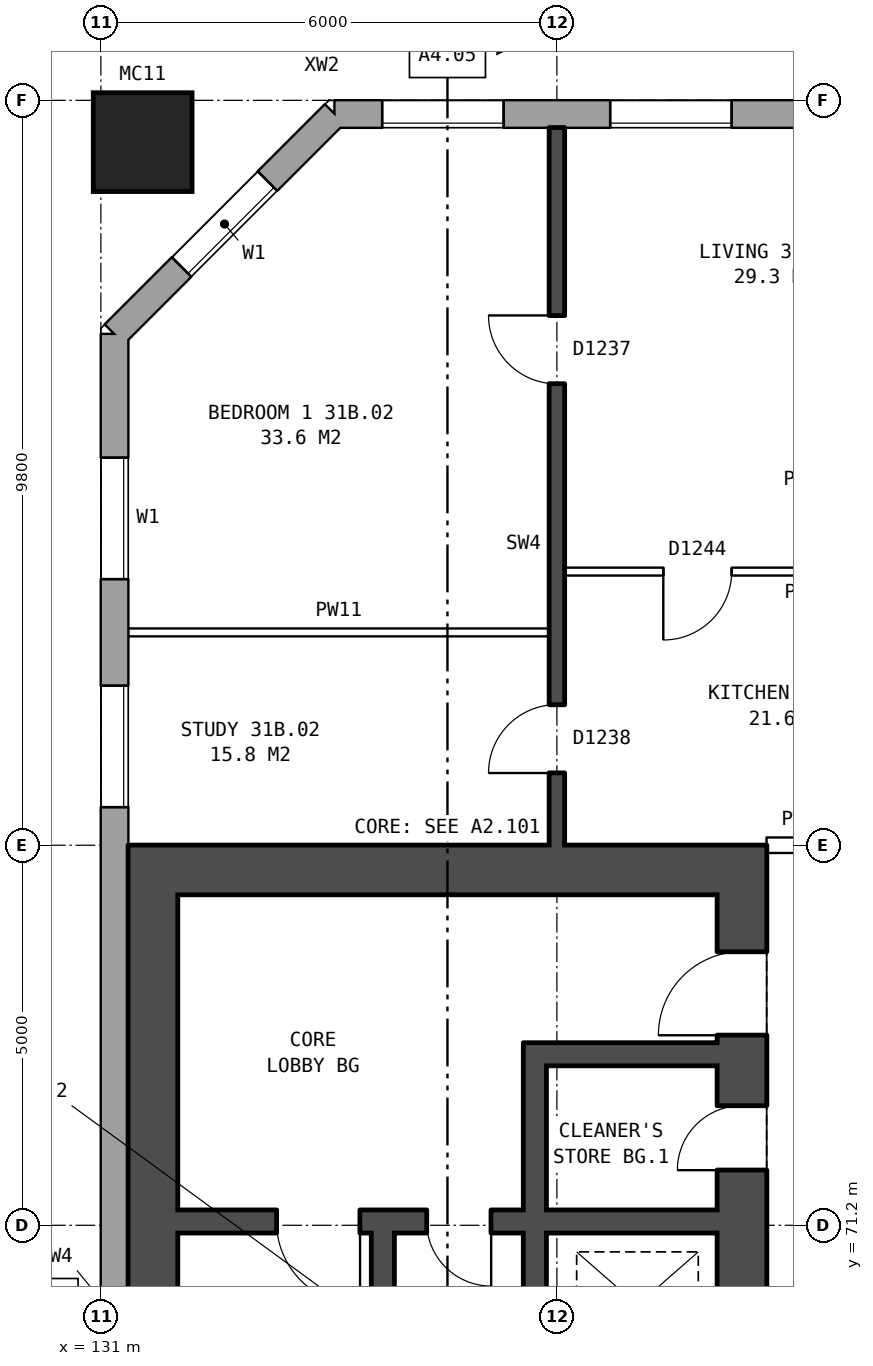
"""IFC4 building model, lengths in metres.
Left out: names, types, materials, properties, quantities, classifications, styles, units other than length and angle.
Written with IfcOpenShell. Run it as: python <this file> out.ifc"""

import sys

from ifc_helpers import new_model, si_unit, direction, frame, frame_2d, origin, origin_2d, place, context, subcontext, project, spatial, rectangle, hollow_rectangle, extrude, element, fill, save


model = new_model("IFC4")
c1 = context("Model", 3, precision=1e-05, world=origin(), true_north=direction((0.0, 1.0)))
c2 = subcontext(c1, "Body", "Model", "MODEL_VIEW")
j1 = project(units=[si_unit("LENGTHUNIT", "METRE"), si_unit("PLANEANGLEUNIT", "RADIAN")], contexts=[c1])
p1 = place(None, origin())
s1 = spatial("IfcSite", under=j1, at=p1, CompositionType="ELEMENT")
p2 = place(p1, origin())
s2 = spatial("IfcBuilding", under=s1, at=p2, CompositionType="ELEMENT")
p3 = place(p2, frame((0.0, 0.0, 111.9)))
s3 = spatial("IfcBuildingStorey", under=s2, at=p3, CompositionType="ELEMENT", Elevation=111.9)
p4 = place(p3, frame((131.55, 85.45, 0.0), z_axis=(0.0, 0.0, 1.0), x_axis=(1.0, 0.0, 0.0)))
e1 = element("IfcColumn", 1, at=p4, inside=s3, PredefinedType="COLUMN", context=c2, shape_type="SweptSolid", body=[
    extrude(hollow_rectangle(XDim=1.3, YDim=1.3, WallThickness=0.07, at=origin_2d()), origin(), (0.0, 0.0, 1.0), 3.1),
])
p5 = place(p3, frame((170.925, 85.82, 0.0), z_axis=(0.0, 0.0, 1.0), x_axis=(-1.0, 0.0, 0.0)))
e2 = element("IfcWall", 2, at=p5, inside=s3, PredefinedType="STANDARD", context=c2, shape_type="SweptSolid", body=[
    extrude(rectangle(XDim=36.851, YDim=0.36, at=frame_2d((18.425, 0.0))), origin(), (0.0, 0.0, 1.0), 2.85),
])
p6 = place(p5, frame((1.625, 0.0, 0.8)))
e3 = element("IfcOpeningElement", 3, at=p6, cuts=e2, PredefinedType="OPENING", context=c2, shape_type="SweptSolid", body=[
    extrude(rectangle(XDim=1.6, YDim=1.8, at=frame_2d((0.8, 0.9))), frame((0.0, 0.19, 0.0), z_axis=(0.0, -1.0, 0.0), x_axis=(1.0, 0.0, 0.0)), (0.0, 0.0, 1.0), 0.38),
])
p7 = place(p5, frame((4.625, 0.0, 0.8)))
e4 = element("IfcOpeningElement", 4, at=p7, cuts=e2, PredefinedType="OPENING", context=c2, shape_type="SweptSolid", body=[
    extrude(rectangle(XDim=1.6, YDim=1.8, at=frame_2d((0.8, 0.9))), frame((0.0, 0.19, 0.0), z_axis=(0.0, -1.0, 0.0), x_axis=(1.0, 0.0, 0.0)), (0.0, 0.0, 1.0), 0.38),
])
p8 = place(p5, frame((7.625, 0.0, 0.8)))
e5 = element("IfcOpeningElement", 5, at=p8, cuts=e2, PredefinedType="OPENING", context=c2, shape_type="SweptSolid", body=[
    extrude(rectangle(XDim=1.6, YDim=1.8, at=frame_2d((0.8, 0.9))), frame((0.0, 0.19, 0.0), z_axis=(0.0, -1.0, 0.0), x_axis=(1.0, 0.0, 0.0)), (0.0, 0.0, 1.0), 0.38),
])
p9 = place(p5, frame((10.625, 0.0, 0.8)))
e6 = element("IfcOpeningElement", 6, at=p9, cuts=e2, PredefinedType="OPENING", context=c2, shape_type="SweptSolid", body=[
    extrude(rectangle(XDim=1.6, YDim=1.8, at=frame_2d((0.8, 0.9))), frame((0.0, 0.19, 0.0), z_axis=(0.0, -1.0, 0.0), x_axis=(1.0, 0.0, 0.0)), (0.0, 0.0, 1.0), 0.38),
])
p10 = place(p5, frame((13.625, 0.0, 0.8)))
e7 = element("IfcOpeningElement", 7, at=p10, cuts=e2, PredefinedType="OPENING", context=c2, shape_type="SweptSolid", body=[
    extrude(rectangle(XDim=1.6, YDim=1.8, at=frame_2d((0.8, 0.9))), frame((0.0, 0.19, 0.0), z_axis=(0.0, -1.0, 0.0), x_axis=(1.0, 0.0, 0.0)), (0.0, 0.0, 1.0), 0.38),
])
p11 = place(p5, frame((17.075, 0.0, 0.15)))
e8 = element("IfcOpeningElement", 8, at=p11, cuts=e2, PredefinedType="OPENING", context=c2, shape_type="SweptSolid", body=[
    extrude(rectangle(XDim=0.6, YDim=0.9, at=frame_2d((0.3, 0.45))), frame((0.0, 0.19, 0.0), z_axis=(0.0, -1.0, 0.0), x_axis=(1.0, 0.0, 0.0)), (0.0, 0.0, 1.0), 0.38),
])
p12 = place(p5, frame((19.075, 0.0, 0.25)))
e9 = element("IfcOpeningElement", 9, at=p12, cuts=e2, PredefinedType="OPENING", context=c2, shape_type="SweptSolid", body=[
    extrude(rectangle(XDim=0.6, YDim=0.9, at=frame_2d((0.3, 0.45))), frame((0.0, 0.19, 0.0), z_axis=(0.0, -1.0, 0.0), x_axis=(1.0, 0.0, 0.0)), (0.0, 0.0, 1.0), 0.38),
])
p13 = place(p5, frame((22.625, 0.0, 0.8)))
e10 = element("IfcOpeningElement", 10, at=p13, cuts=e2, PredefinedType="OPENING", context=c2, shape_type="SweptSolid", body=[
    extrude(rectangle(XDim=1.6, YDim=1.8, at=frame_2d((0.8, 0.9))), frame((0.0, 0.19, 0.0), z_axis=(0.0, -1.0, 0.0), x_axis=(1.0, 0.0, 0.0)), (0.0, 0.0, 1.0), 0.38),
])
p14 = place(p5, frame((25.625, 0.0, 0.8)))
e11 = element("IfcOpeningElement", 11, at=p14, cuts=e2, PredefinedType="OPENING", context=c2, shape_type="SweptSolid", body=[
    extrude(rectangle(XDim=1.6, YDim=1.8, at=frame_2d((0.8, 0.9))), frame((0.0, 0.19, 0.0), z_axis=(0.0, -1.0, 0.0), x_axis=(1.0, 0.0, 0.0)), (0.0, 0.0, 1.0), 0.38),
])
p15 = place(p5, frame((28.625, 0.0, 0.8)))
e12 = element("IfcOpeningElement", 12, at=p15, cuts=e2, PredefinedType="OPENING", context=c2, shape_type="SweptSolid", body=[
    extrude(rectangle(XDim=1.6, YDim=1.8, at=frame_2d((0.8, 0.9))), frame((0.0, 0.19, 0.0), z_axis=(0.0, -1.0, 0.0), x_axis=(1.0, 0.0, 0.0)), (0.0, 0.0, 1.0), 0.38),
])
p16 = place(p5, frame((31.625, 0.0, 0.8)))
e13 = element("IfcOpeningElement", 13, at=p16, cuts=e2, PredefinedType="OPENING", context=c2, shape_type="SweptSolid", body=[
    extrude(rectangle(XDim=1.6, YDim=1.8, at=frame_2d((0.8, 0.9))), frame((0.0, 0.19, 0.0), z_axis=(0.0, -1.0, 0.0), x_axis=(1.0, 0.0, 0.0)), (0.0, 0.0, 1.0), 0.38),
])
p17 = place(p5, frame((34.625, 0.0, 0.8)))
e14 = element("IfcOpeningElement", 14, at=p17, cuts=e2, PredefinedType="OPENING", context=c2, shape_type="SweptSolid", body=[
    extrude(rectangle(XDim=1.6, YDim=1.8, at=frame_2d((0.8, 0.9))), frame((0.0, 0.19, 0.0), z_axis=(0.0, -1.0, 0.0), x_axis=(1.0, 0.0, 0.0)), (0.0, 0.0, 1.0), 0.38),
])
p18 = place(p5, frame((17.975, 0.0, 0.25)))
e15 = element("IfcOpeningElement", 15, at=p18, cuts=e2, PredefinedType="OPENING", context=c2, shape_type="SweptSolid", body=[
    extrude(rectangle(XDim=0.8, YDim=1.5, at=frame_2d((0.4, 0.75))), frame((0.0, 0.19, 0.0), z_axis=(0.0, -1.0, 0.0), x_axis=(1.0, 0.0, 0.0)), (0.0, 0.0, 1.0), 0.38),
])
p19 = place(p5, frame((20.525, 0.0, 1.35)))
e16 = element("IfcOpeningElement", 16, at=p19, cuts=e2, PredefinedType="OPENING", context=c2, shape_type="SweptSolid", body=[
    extrude(rectangle(XDim=1.2, YDim=1.2, at=frame_2d((0.6, 0.6))), frame((0.0, 0.19, 0.0), z_axis=(0.0, -1.0, 0.0), x_axis=(1.0, 0.0, 0.0)), (0.0, 0.0, 1.0), 0.38),
])
p20 = place(p3, frame((134.075, 85.82, 0.0), z_axis=(0.0, 0.0, 1.0), x_axis=(-0.707106781187, -0.707106781187, 0.0)))
e17 = element("IfcWall", 17, at=p20, inside=s3, PredefinedType="STANDARD", context=c2, shape_type="SweptSolid", body=[
    extrude(rectangle(XDim=4.094, YDim=0.36, at=frame_2d((2.047, 0.0))), origin(), (0.0, 0.0, 1.0), 2.85),
])
p21 = place(p20, frame((1.247, 0.0, 0.8)))
e18 = element("IfcOpeningElement", 18, at=p21, cuts=e17, PredefinedType="OPENING", context=c2, shape_type="SweptSolid", body=[
    extrude(rectangle(XDim=1.6, YDim=1.8, at=frame_2d((0.8, 0.9))), frame((0.0, 0.19, 0.0), z_axis=(0.0, -1.0, 0.0), x_axis=(1.0, 0.0, 0.0)), (0.0, 0.0, 1.0), 0.38),
])
p22 = place(p3, frame((131.18, 82.925, 0.0), z_axis=(0.0, 0.0, 1.0), x_axis=(0.0, -1.0, 0.0)))
e19 = element("IfcWall", 19, at=p22, inside=s3, PredefinedType="STANDARD", context=c2, shape_type="SweptSolid", body=[
    extrude(rectangle(XDim=25.851, YDim=0.36, at=frame_2d((12.925, 0.0))), origin(), (0.0, 0.0, 1.0), 2.85),
])
p23 = place(p22, frame((1.625, 0.0, 0.8)))
e20 = element("IfcOpeningElement", 20, at=p23, cuts=e19, PredefinedType="OPENING", context=c2, shape_type="SweptSolid", body=[
    extrude(rectangle(XDim=1.6, YDim=1.8, at=frame_2d((0.8, 0.9))), frame((0.0, 0.19, 0.0), z_axis=(0.0, -1.0, 0.0), x_axis=(1.0, 0.0, 0.0)), (0.0, 0.0, 1.0), 0.38),
])
p24 = place(p22, frame((4.625, 0.0, 0.8)))
e21 = element("IfcOpeningElement", 21, at=p24, cuts=e19, PredefinedType="OPENING", context=c2, shape_type="SweptSolid", body=[
    extrude(rectangle(XDim=1.6, YDim=1.8, at=frame_2d((0.8, 0.9))), frame((0.0, 0.19, 0.0), z_axis=(0.0, -1.0, 0.0), x_axis=(1.0, 0.0, 0.0)), (0.0, 0.0, 1.0), 0.38),
])
p25 = place(p22, frame((19.625, 0.0, 0.8)))
e22 = element("IfcOpeningElement", 22, at=p25, cuts=e19, PredefinedType="OPENING", context=c2, shape_type="SweptSolid", body=[
    extrude(rectangle(XDim=1.6, YDim=1.8, at=frame_2d((0.8, 0.9))), frame((0.0, 0.19, 0.0), z_axis=(0.0, -1.0, 0.0), x_axis=(1.0, 0.0, 0.0)), (0.0, 0.0, 1.0), 0.38),
])
p26 = place(p22, frame((22.625, 0.0, 0.8)))
e23 = element("IfcOpeningElement", 23, at=p26, cuts=e19, PredefinedType="OPENING", context=c2, shape_type="SweptSolid", body=[
    extrude(rectangle(XDim=1.6, YDim=1.8, at=frame_2d((0.8, 0.9))), frame((0.0, 0.19, 0.0), z_axis=(0.0, -1.0, 0.0), x_axis=(1.0, 0.0, 0.0)), (0.0, 0.0, 1.0), 0.38),
])
p27 = place(p3, frame((139.435, 64.45, 0.0), z_axis=(0.0, 0.0, 1.0), x_axis=(0.0, 1.0, 0.0)))
e24 = element("IfcWall", 24, at=p27, inside=s3, PredefinedType="SHEAR", context=c2, shape_type="SweptSolid", body=[
    extrude(rectangle(XDim=11.1, YDim=0.65, at=frame_2d((5.55, 0.0))), origin(), (0.0, 0.0, 1.0), 2.85),
])
p28 = place(p27, frame((0.675, 0.0, 0.0)))
e25 = element("IfcOpeningElement", 25, at=p28, cuts=e24, PredefinedType="OPENING", context=c2, shape_type="SweptSolid", body=[
    extrude(rectangle(XDim=1.1, YDim=2.1, at=frame_2d((0.55, 1.05))), frame((0.0, 0.335, 0.0), z_axis=(0.0, -1.0, 0.0), x_axis=(1.0, 0.0, 0.0)), (0.0, 0.0, 1.0), 0.67),
])
p29 = place(p27, frame((9.25, 0.0, 0.0)))
e26 = element("IfcOpeningElement", 26, at=p29, cuts=e24, PredefinedType="OPENING", context=c2, shape_type="SweptSolid", body=[
    extrude(rectangle(XDim=1.1, YDim=2.1, at=frame_2d((0.55, 1.05))), frame((0.0, 0.335, 0.0), z_axis=(0.0, -1.0, 0.0), x_axis=(1.0, 0.0, 0.0)), (0.0, 0.0, 1.0), 0.67),
])
p30 = place(p27, frame((7.475, 0.0, 0.0)))
e27 = element("IfcOpeningElement", 27, at=p30, cuts=e24, PredefinedType="OPENING", context=c2, shape_type="SweptSolid", body=[
    extrude(rectangle(XDim=0.85, YDim=2.1, at=frame_2d((0.425, 1.05))), frame((0.0, 0.335, 0.0), z_axis=(0.0, -1.0, 0.0), x_axis=(1.0, 0.0, 0.0)), (0.0, 0.0, 1.0), 0.67),
])
p31 = place(p3, frame((131.685, 64.45, 0.0), z_axis=(0.0, 0.0, 1.0), x_axis=(0.0, 1.0, 0.0)))
e28 = element("IfcWall", 28, at=p31, inside=s3, PredefinedType="SHEAR", context=c2, shape_type="SweptSolid", body=[
    extrude(rectangle(XDim=11.1, YDim=0.65, at=frame_2d((5.55, 0.0))), origin(), (0.0, 0.0, 1.0), 2.85),
])
p32 = place(p3, frame((139.76, 75.875, 0.0), z_axis=(0.0, 0.0, 1.0), x_axis=(-1.0, 0.0, 0.0)))
e29 = element("IfcWall", 29, at=p32, inside=s3, PredefinedType="SHEAR", context=c2, shape_type="SweptSolid", body=[
    extrude(rectangle(XDim=8.4, YDim=0.65, at=frame_2d((4.2, 0.0))), origin(), (0.0, 0.0, 1.0), 2.85),
])
p33 = place(p3, frame((139.11, 71.25, 0.0), z_axis=(0.0, 0.0, 1.0), x_axis=(-1.0, 0.0, 0.0)))
e30 = element("IfcWall", 30, at=p33, inside=s3, PredefinedType="SHEAR", context=c2, shape_type="SweptSolid", body=[
    extrude(rectangle(XDim=7.1, YDim=0.3, at=frame_2d((3.55, 0.0))), origin(), (0.0, 0.0, 1.0), 2.85),
])
p34 = place(p33, frame((4.7, 0.0, 0.0)))
e31 = element("IfcOpeningElement", 31, at=p34, cuts=e30, PredefinedType="OPENING", context=c2, shape_type="SweptSolid", body=[
    extrude(rectangle(XDim=1.1, YDim=2.1, at=frame_2d((0.55, 1.05))), frame((0.0, 0.16, 0.0), z_axis=(0.0, -1.0, 0.0), x_axis=(1.0, 0.0, 0.0)), (0.0, 0.0, 1.0), 0.32),
])
p35 = place(p33, frame((2.975, 0.0, 0.0)))
e32 = element("IfcOpeningElement", 32, at=p35, cuts=e30, PredefinedType="OPENING", context=c2, shape_type="SweptSolid", body=[
    extrude(rectangle(XDim=0.85, YDim=2.1, at=frame_2d((0.425, 1.05))), frame((0.0, 0.16, 0.0), z_axis=(0.0, -1.0, 0.0), x_axis=(1.0, 0.0, 0.0)), (0.0, 0.0, 1.0), 0.32),
])
p36 = place(p3, frame((139.11, 73.45, 0.0), z_axis=(0.0, 0.0, 1.0), x_axis=(-1.0, 0.0, 0.0)))
e33 = element("IfcWall", 33, at=p36, inside=s3, PredefinedType="SHEAR", context=c2, shape_type="SweptSolid", body=[
    extrude(rectangle(XDim=2.25, YDim=0.3, at=frame_2d((1.125, 0.0))), origin(), (0.0, 0.0, 1.0), 2.85),
])
p37 = place(p3, frame((136.71, 67.0, 0.0), z_axis=(0.0, 0.0, 1.0), x_axis=(0.0, 1.0, 0.0)))
e34 = element("IfcWall", 34, at=p37, inside=s3, PredefinedType="SHEAR", context=c2, shape_type="SweptSolid", body=[
    extrude(rectangle(XDim=4.1, YDim=0.3, at=frame_2d((2.05, 0.0))), origin(), (0.0, 0.0, 1.0), 2.85),
])
p38 = place(p3, frame((136.71, 71.4, 0.0), z_axis=(0.0, 0.0, 1.0), x_axis=(0.0, 1.0, 0.0)))
e35 = element("IfcWall", 35, at=p38, inside=s3, PredefinedType="SHEAR", context=c2, shape_type="SweptSolid", body=[
    extrude(rectangle(XDim=2.2, YDim=0.3, at=frame_2d((1.1, 0.0))), origin(), (0.0, 0.0, 1.0), 2.85),
])
p39 = place(p3, frame((134.71, 64.45, 0.0), z_axis=(0.0, 0.0, 1.0), x_axis=(0.0, 1.0, 0.0)))
e36 = element("IfcWall", 36, at=p39, inside=s3, PredefinedType="SHEAR", context=c2, shape_type="SweptSolid", body=[
    extrude(rectangle(XDim=6.65, YDim=0.3, at=frame_2d((3.325, 0.0))), origin(), (0.0, 0.0, 1.0), 2.85),
])
p40 = place(p3, frame((139.76, 76.2, 0.0), z_axis=(0.0, 0.0, 1.0), x_axis=(1.0, 0.0, 0.0)))
e37 = element("IfcWall", 37, at=p40, inside=s3, PredefinedType="PARTITIONING", context=c2, shape_type="SweptSolid", body=[
    extrude(rectangle(XDim=3.0, YDim=0.2, at=frame_2d((1.5, 0.0))), origin(), (0.0, 0.0, 1.0), 2.85),
])
p41 = place(p40, frame((1.0, 0.0, 0.0)))
e38 = element("IfcOpeningElement", 38, at=p41, cuts=e37, PredefinedType="OPENING", context=c2, shape_type="SweptSolid", body=[
    extrude(rectangle(XDim=1.0, YDim=2.1, at=frame_2d((0.5, 1.05))), frame((0.0, 0.11, 0.0), z_axis=(0.0, -1.0, 0.0), x_axis=(1.0, 0.0, 0.0)), (0.0, 0.0, 1.0), 0.22),
])
p42 = place(p3, frame((131.36, 79.0, 0.0), z_axis=(0.0, 0.0, 1.0), x_axis=(1.0, 0.0, 0.0)))
e39 = element("IfcWall", 39, at=p42, inside=s3, PredefinedType="PARTITIONING", context=c2, shape_type="SweptSolid", body=[
    extrude(rectangle(XDim=5.54, YDim=0.1, at=frame_2d((2.77, 0.0))), origin(), (0.0, 0.0, 1.0), 2.85),
])
p43 = place(p3, frame((137.1, 79.8, 0.0), z_axis=(0.0, 0.0, 1.0), x_axis=(1.0, 0.0, 0.0)))
e40 = element("IfcWall", 40, at=p43, inside=s3, PredefinedType="PARTITIONING", context=c2, shape_type="SweptSolid", body=[
    extrude(rectangle(XDim=5.8, YDim=0.1, at=frame_2d((2.9, 0.0))), origin(), (0.0, 0.0, 1.0), 2.85),
])
p44 = place(p43, frame((1.3, 0.0, 0.0)))
e41 = element("IfcOpeningElement", 41, at=p44, cuts=e40, PredefinedType="OPENING", context=c2, shape_type="SweptSolid", body=[
    extrude(rectangle(XDim=0.9, YDim=2.1, at=frame_2d((0.45, 1.05))), frame((0.0, 0.06, 0.0), z_axis=(0.0, -1.0, 0.0), x_axis=(1.0, 0.0, 0.0)), (0.0, 0.0, 1.0), 0.12),
])
p45 = place(p43, frame((4.2, 0.0, 0.0)))
e42 = element("IfcOpeningElement", 42, at=p45, cuts=e40, PredefinedType="OPENING", context=c2, shape_type="SweptSolid", body=[
    extrude(rectangle(XDim=0.9, YDim=2.1, at=frame_2d((0.45, 1.05))), frame((0.0, 0.06, 0.0), z_axis=(0.0, -1.0, 0.0), x_axis=(1.0, 0.0, 0.0)), (0.0, 0.0, 1.0), 0.12),
])
p46 = place(p3, frame((137.0, 76.2, 0.0), z_axis=(0.0, 0.0, 1.0), x_axis=(0.0, 1.0, 0.0)))
e43 = element("IfcWall", 43, at=p46, inside=s3, PredefinedType="SOLIDWALL", context=c2, shape_type="SweptSolid", body=[
    extrude(rectangle(XDim=9.44, YDim=0.2, at=frame_2d((4.72, 0.0))), origin(), (0.0, 0.0, 1.0), 2.85),
])
p47 = place(p46, frame((6.07, 0.0, 0.0)))
e44 = element("IfcOpeningElement", 44, at=p47, cuts=e43, PredefinedType="OPENING", context=c2, shape_type="SweptSolid", body=[
    extrude(rectangle(XDim=0.9, YDim=2.1, at=frame_2d((0.45, 1.05))), frame((0.0, 0.11, 0.0), z_axis=(0.0, -1.0, 0.0), x_axis=(1.0, 0.0, 0.0)), (0.0, 0.0, 1.0), 0.22),
])
p48 = place(p46, frame((0.95, 0.0, 0.0)))
e45 = element("IfcOpeningElement", 45, at=p48, cuts=e43, PredefinedType="OPENING", context=c2, shape_type="SweptSolid", body=[
    extrude(rectangle(XDim=0.9, YDim=2.1, at=frame_2d((0.45, 1.05))), frame((0.0, 0.11, 0.0), z_axis=(0.0, -1.0, 0.0), x_axis=(1.0, 0.0, 0.0)), (0.0, 0.0, 1.0), 0.22),
])
p49 = place(p16, origin())
e46 = element("IfcWindow", 46, at=p49, inside=s3, PartitioningType="SINGLE_PANEL", PredefinedType="WINDOW", context=c2, shape_type="SweptSolid", body=[
    extrude(rectangle(XDim=1.6, YDim=1.8, at=frame_2d((0.8, 0.9))), frame((0.0, 0.15, 0.0), z_axis=(0.0, -1.0, 0.0), x_axis=(1.0, 0.0, 0.0)), (0.0, 0.0, 1.0), 0.06),
])
fill(e13, e46)
p50 = place(p17, origin())
e47 = element("IfcWindow", 47, at=p50, inside=s3, PartitioningType="SINGLE_PANEL", PredefinedType="WINDOW", context=c2, shape_type="SweptSolid", body=[
    extrude(rectangle(XDim=1.6, YDim=1.8, at=frame_2d((0.8, 0.9))), frame((0.0, 0.15, 0.0), z_axis=(0.0, -1.0, 0.0), x_axis=(1.0, 0.0, 0.0)), (0.0, 0.0, 1.0), 0.06),
])
fill(e14, e47)
p51 = place(p21, origin())
e48 = element("IfcWindow", 48, at=p51, inside=s3, PartitioningType="SINGLE_PANEL", PredefinedType="WINDOW", context=c2, shape_type="SweptSolid", body=[
    extrude(rectangle(XDim=1.6, YDim=1.8, at=frame_2d((0.8, 0.9))), frame((0.0, 0.15, 0.0), z_axis=(0.0, -1.0, 0.0), x_axis=(1.0, 0.0, 0.0)), (0.0, 0.0, 1.0), 0.06),
])
fill(e18, e48)
p52 = place(p23, origin())
e49 = element("IfcWindow", 49, at=p52, inside=s3, PartitioningType="SINGLE_PANEL", PredefinedType="WINDOW", context=c2, shape_type="SweptSolid", body=[
    extrude(rectangle(XDim=1.6, YDim=1.8, at=frame_2d((0.8, 0.9))), frame((0.0, 0.15, 0.0), z_axis=(0.0, -1.0, 0.0), x_axis=(1.0, 0.0, 0.0)), (0.0, 0.0, 1.0), 0.06),
])
fill(e20, e49)
p53 = place(p24, origin())
e50 = element("IfcWindow", 50, at=p53, inside=s3, PartitioningType="SINGLE_PANEL", PredefinedType="WINDOW", context=c2, shape_type="SweptSolid", body=[
    extrude(rectangle(XDim=1.6, YDim=1.8, at=frame_2d((0.8, 0.9))), frame((0.0, 0.15, 0.0), z_axis=(0.0, -1.0, 0.0), x_axis=(1.0, 0.0, 0.0)), (0.0, 0.0, 1.0), 0.06),
])
fill(e21, e50)
p54 = place(p29, origin())
e51 = element("IfcDoor", 51, at=p54, inside=s3, OperationType="SINGLE_SWING_LEFT", PredefinedType="DOOR", context=c2, shape_type="SweptSolid", body=[
    extrude(rectangle(XDim=1.1, YDim=2.1, at=frame_2d((0.55, 1.05))), frame((0.0, 0.31, 0.0), z_axis=(0.0, -1.0, 0.0), x_axis=(1.0, 0.0, 0.0)), (0.0, 0.0, 1.0), 0.05),
])
fill(e26, e51)
p55 = place(p34, origin())
e52 = element("IfcDoor", 52, at=p55, inside=s3, OperationType="SINGLE_SWING_LEFT", PredefinedType="DOOR", context=c2, shape_type="SweptSolid", body=[
    extrude(rectangle(XDim=1.1, YDim=2.1, at=frame_2d((0.55, 1.05))), frame((0.0, 0.025, 0.0), z_axis=(0.0, -1.0, 0.0), x_axis=(1.0, 0.0, 0.0)), (0.0, 0.0, 1.0), 0.05),
])
fill(e31, e52)
p56 = place(p30, origin())
e53 = element("IfcDoor", 53, at=p56, inside=s3, OperationType="SINGLE_SWING_LEFT", PredefinedType="DOOR", context=c2, shape_type="SweptSolid", body=[
    extrude(rectangle(XDim=0.85, YDim=2.1, at=frame_2d((0.425, 1.05))), frame((0.0, 0.31, 0.0), z_axis=(0.0, -1.0, 0.0), x_axis=(1.0, 0.0, 0.0)), (0.0, 0.0, 1.0), 0.05),
])
fill(e27, e53)
p57 = place(p35, origin())
e54 = element("IfcDoor", 54, at=p57, inside=s3, OperationType="SINGLE_SWING_LEFT", PredefinedType="DOOR", context=c2, shape_type="SweptSolid", body=[
    extrude(rectangle(XDim=0.85, YDim=2.1, at=frame_2d((0.425, 1.05))), frame((0.0, 0.025, 0.0), z_axis=(0.0, -1.0, 0.0), x_axis=(1.0, 0.0, 0.0)), (0.0, 0.0, 1.0), 0.05),
])
fill(e32, e54)
p58 = place(p47, origin())
e55 = element("IfcDoor", 55, at=p58, inside=s3, OperationType="SINGLE_SWING_RIGHT", PredefinedType="DOOR", context=c2, shape_type="SweptSolid", body=[
    extrude(rectangle(XDim=0.9, YDim=2.1, at=frame_2d((0.45, 1.05))), frame((0.0, 0.025, 0.0), z_axis=(0.0, -1.0, 0.0), x_axis=(1.0, 0.0, 0.0)), (0.0, 0.0, 1.0), 0.05),
])
fill(e44, e55)
p59 = place(p48, origin())
e56 = element("IfcDoor", 56, at=p59, inside=s3, OperationType="SINGLE_SWING_LEFT", PredefinedType="DOOR", context=c2, shape_type="SweptSolid", body=[
    extrude(rectangle(XDim=0.9, YDim=2.1, at=frame_2d((0.45, 1.05))), frame((0.0, 0.025, 0.0), z_axis=(0.0, -1.0, 0.0), x_axis=(1.0, 0.0, 0.0)), (0.0, 0.0, 1.0), 0.05),
])
fill(e45, e56)
p60 = place(p44, frame((0.9, 0.0, 0.0), z_axis=(0.0, 0.0, 1.0), x_axis=(-1.0, 0.0, 0.0)))
e57 = element("IfcDoor", 57, at=p60, inside=s3, OperationType="SINGLE_SWING_RIGHT", PredefinedType="DOOR", context=c2, shape_type="SweptSolid", body=[
    extrude(rectangle(XDim=0.9, YDim=2.1, at=frame_2d((0.45, 1.05))), frame((0.0, 0.025, 0.0), z_axis=(0.0, -1.0, 0.0), x_axis=(1.0, 0.0, 0.0)), (0.0, 0.0, 1.0), 0.05),
])
fill(e41, e57)
save(model, sys.argv[1])
